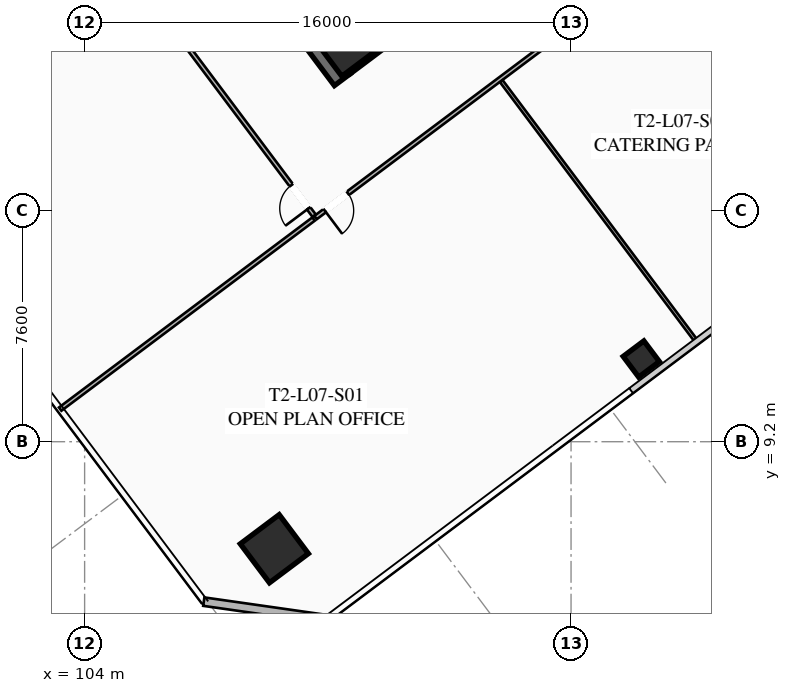
"""IFC4 building model, lengths in metres.
Left out: names, types, materials, properties, quantities, classifications, styles, units other than length and angle.
Written with IfcOpenShell. Run it as: python <this file> out.ifc"""

import sys

from ifc_helpers import new_model, si_unit, direction, frame, frame_2d, origin, origin_2d, place, context, subcontext, project, spatial, rectangle, hollow_rectangle, extrude, element, fill, save


model = new_model("IFC4")
c1 = context("Model", 3, precision=1e-05, world=origin(), true_north=direction((0.0, 1.0)))
c2 = subcontext(c1, "Body", "Model", "MODEL_VIEW")
j1 = project(units=[si_unit("LENGTHUNIT", "METRE"), si_unit("PLANEANGLEUNIT", "RADIAN")], contexts=[c1])
p1 = place(None, origin())
s1 = spatial("IfcSite", under=j1, at=p1, CompositionType="ELEMENT")
p2 = place(p1, origin())
s2 = spatial("IfcBuilding", under=s1, at=p2, CompositionType="ELEMENT")
p3 = place(p2, frame((0.0, 0.0, 31.7)))
s3 = spatial("IfcBuildingStorey", under=s2, at=p3, CompositionType="ELEMENT", Elevation=31.7)
p4 = place(p3, frame((112.476, 21.107, 0.0), z_axis=(0.0, 0.0, 1.0), x_axis=(-0.600005007985, 0.799996243986, 0.0)))
e1 = element("IfcWall", 1, at=p4, inside=s3, PredefinedType="SHEAR", context=c2, shape_type="SweptSolid", body=[
    extrude(rectangle(XDim=15.6, YDim=0.65, at=frame_2d((7.8, 0.0))), origin(), (0.0, 0.0, 1.0), 3.55),
])
p5 = place(p3, frame((124.429, 30.478, 0.0), z_axis=(0.0, 0.0, 1.0), x_axis=(-0.799998028465, -0.600002628705, 0.0)))
e2 = element("IfcWall", 2, at=p5, inside=s3, PredefinedType="SHEAR", context=c2, shape_type="SweptSolid", body=[
    extrude(rectangle(XDim=14.86, YDim=0.65, at=frame_2d((7.43, 0.0))), origin(), (0.0, 0.0, 1.0), 3.55),
])
p6 = place(p5, frame((9.13, 0.0, 0.0)))
e3 = element("IfcOpeningElement", 3, at=p6, cuts=e2, PredefinedType="OPENING", context=c2, shape_type="SweptSolid", body=[
    extrude(rectangle(XDim=1.25, YDim=2.25, at=frame_2d((0.625, 1.125))), frame((0.0, 0.335, 0.0), z_axis=(0.0, -1.0, 0.0), x_axis=(1.0, 0.0, 0.0)), (0.0, 0.0, 1.0), 0.67),
])
p7 = place(p5, frame((4.08, 0.0, 0.0)))
e4 = element("IfcOpeningElement", 4, at=p7, cuts=e2, PredefinedType="OPENING", context=c2, shape_type="SweptSolid", body=[
    extrude(rectangle(XDim=1.25, YDim=2.25, at=frame_2d((0.625, 1.125))), frame((0.0, 0.335, 0.0), z_axis=(0.0, -1.0, 0.0), x_axis=(1.0, 0.0, 0.0)), (0.0, 0.0, 1.0), 0.67),
])
p8 = place(p3, frame((112.59, 22.13, 0.0), z_axis=(0.0, 0.0, 1.0), x_axis=(0.799999996291, 0.600000004945, 0.0)))
e5 = element("IfcColumn", 5, at=p8, inside=s3, PredefinedType="COLUMN", context=c2, shape_type="SweptSolid", body=[
    extrude(hollow_rectangle(XDim=1.3, YDim=1.3, WallThickness=0.05, at=origin_2d()), origin(), (0.0, 0.0, 1.0), 3.35),
])
p9 = place(p3, frame((110.24, 5.68, 0.0), z_axis=(0.0, 0.0, 1.0), x_axis=(0.799999996291, 0.600000004945, 0.0)))
e6 = element("IfcColumn", 6, at=p9, inside=s3, PredefinedType="COLUMN", context=c2, shape_type="SweptSolid", body=[
    extrude(hollow_rectangle(XDim=1.6, YDim=1.6, WallThickness=0.06, at=origin_2d()), origin(), (0.0, 0.0, 1.0), 3.35),
])
p10 = place(p3, frame((122.31, 11.92, 0.0), z_axis=(0.0, 0.0, 1.0), x_axis=(0.799999996291, 0.600000004945, 0.0)))
e7 = element("IfcColumn", 7, at=p10, inside=s3, PredefinedType="COLUMN", context=c2, shape_type="SweptSolid", body=[
    extrude(hollow_rectangle(XDim=0.85, YDim=0.85, WallThickness=0.035, at=origin_2d()), origin(), (0.0, 0.0, 1.0), 3.35),
])
p11 = place(p3, frame((111.98, 3.36, 0.0), z_axis=(0.0, 0.0, 1.0), x_axis=(-0.989955445613, 0.14137968631, 0.0)))
e8 = element("IfcWall", 8, at=p11, inside=s3, PredefinedType="SOLIDWALL", context=c2, shape_type="SweptSolid", body=[
    extrude(rectangle(XDim=4.101, YDim=0.28, at=frame_2d((2.051, 0.0))), origin(), (0.0, 0.0, 1.0), 3.35),
])
p12 = place(p3, frame((135.46, 34.47, 0.0), z_axis=(0.0, 0.0, 1.0), x_axis=(-0.800000982127, -0.599998690494, 0.0)))
e9 = element("IfcWall", 9, at=p12, inside=s3, PredefinedType="PARTITIONING", context=c2, shape_type="SweptSolid", body=[
    extrude(rectangle(XDim=29.83, YDim=0.135, at=frame_2d((14.915, 0.0))), origin(), (0.0, 0.0, 1.0), 2.703),
])
p13 = place(p12, frame((28.5, 0.0, 0.0)))
e10 = element("IfcOpeningElement", 10, at=p13, cuts=e9, PredefinedType="OPENING", context=c2, shape_type="SweptSolid", body=[
    extrude(rectangle(XDim=0.95, YDim=2.05, at=frame_2d((0.475, 1.025))), frame((0.0, 0.077, 0.0), z_axis=(0.0, -1.0, 0.0), x_axis=(1.0, 0.0, 0.0)), (0.0, 0.0, 1.0), 0.155),
])
p14 = place(p12, frame((18.075, 0.0, 0.0)))
e11 = element("IfcOpeningElement", 11, at=p14, cuts=e9, PredefinedType="OPENING", context=c2, shape_type="SweptSolid", body=[
    extrude(rectangle(XDim=0.95, YDim=2.05, at=frame_2d((0.475, 1.025))), frame((0.0, 0.077, 0.0), z_axis=(0.0, -1.0, 0.0), x_axis=(1.0, 0.0, 0.0)), (0.0, 0.0, 1.0), 0.155),
])
p15 = place(p12, frame((0.38, 0.0, 0.0)))
e12 = element("IfcOpeningElement", 12, at=p15, cuts=e9, PredefinedType="OPENING", context=c2, shape_type="SweptSolid", body=[
    extrude(rectangle(XDim=0.95, YDim=2.05, at=frame_2d((0.475, 1.025))), frame((0.0, 0.077, 0.0), z_axis=(0.0, -1.0, 0.0), x_axis=(1.0, 0.0, 0.0)), (0.0, 0.0, 1.0), 0.155),
])
p16 = place(p3, frame((124.128, 12.496, 0.0), z_axis=(0.0, 0.0, 1.0), x_axis=(-0.600003650761, 0.799997261916, 0.0)))
e13 = element("IfcWall", 13, at=p16, inside=s3, PredefinedType="PARTITIONING", context=c2, shape_type="SweptSolid", body=[
    extrude(rectangle(XDim=10.7, YDim=0.11, at=frame_2d((5.35, 0.0))), origin(), (0.0, 0.0, 1.0), 2.703),
])
p17 = place(p3, frame((130.048, 16.936, 0.0), z_axis=(0.0, 0.0, 1.0), x_axis=(-0.600007301277, 0.79999452399, 0.0)))
e14 = element("IfcWall", 14, at=p17, inside=s3, PredefinedType="PARTITIONING", context=c2, shape_type="SweptSolid", body=[
    extrude(rectangle(XDim=10.7, YDim=0.11, at=frame_2d((5.35, 0.0))), origin(), (0.0, 0.0, 1.0), 2.703),
])
p18 = place(p3, frame((111.548, 16.636, 0.0), z_axis=(0.0, 0.0, 1.0), x_axis=(-0.600003610192, 0.799997292343, 0.0)))
e15 = element("IfcWall", 15, at=p18, inside=s3, PredefinedType="PARTITIONING", context=c2, shape_type="SweptSolid", body=[
    extrude(rectangle(XDim=21.64, YDim=0.135, at=frame_2d((10.82, 0.0))), origin(), (0.0, 0.0, 1.0), 2.703),
])
p19 = place(p18, frame((0.3, 0.0, 0.0)))
e16 = element("IfcOpeningElement", 16, at=p19, cuts=e15, PredefinedType="OPENING", context=c2, shape_type="SweptSolid", body=[
    extrude(rectangle(XDim=0.95, YDim=2.05, at=frame_2d((0.475, 1.025))), frame((0.0, 0.077, 0.0), z_axis=(0.0, -1.0, 0.0), x_axis=(1.0, 0.0, 0.0)), (0.0, 0.0, 1.0), 0.155),
])
p20 = place(p3, frame((103.196, 10.272, 0.0), z_axis=(0.0, 0.0, 1.0), x_axis=(0.8, 0.6, 0.0)))
e17 = element("IfcWall", 17, at=p20, inside=s3, PredefinedType="PARTITIONING", context=c2, shape_type="SweptSolid", body=[
    extrude(rectangle(XDim=10.42, YDim=0.135, at=frame_2d((5.21, 0.0))), origin(), (0.0, 0.0, 1.0), 2.703),
])
p21 = place(p13, origin())
e18 = element("IfcDoor", 18, at=p21, inside=s3, OperationType="SINGLE_SWING_RIGHT", PredefinedType="DOOR", context=c2, shape_type="SweptSolid", body=[
    extrude(rectangle(XDim=0.95, YDim=2.05, at=frame_2d((0.475, 1.025))), frame((0.0, 0.025, 0.0), z_axis=(0.0, -1.0, 0.0), x_axis=(1.0, 0.0, 0.0)), (0.0, 0.0, 1.0), 0.05),
])
fill(e10, e18)
p22 = place(p19, origin())
e19 = element("IfcDoor", 19, at=p22, inside=s3, OperationType="SINGLE_SWING_LEFT", PredefinedType="DOOR", context=c2, shape_type="SweptSolid", body=[
    extrude(rectangle(XDim=0.95, YDim=2.05, at=frame_2d((0.475, 1.025))), frame((0.0, 0.025, 0.0), z_axis=(0.0, -1.0, 0.0), x_axis=(1.0, 0.0, 0.0)), (0.0, 0.0, 1.0), 0.05),
])
fill(e16, e19)
save(model, sys.argv[1])
